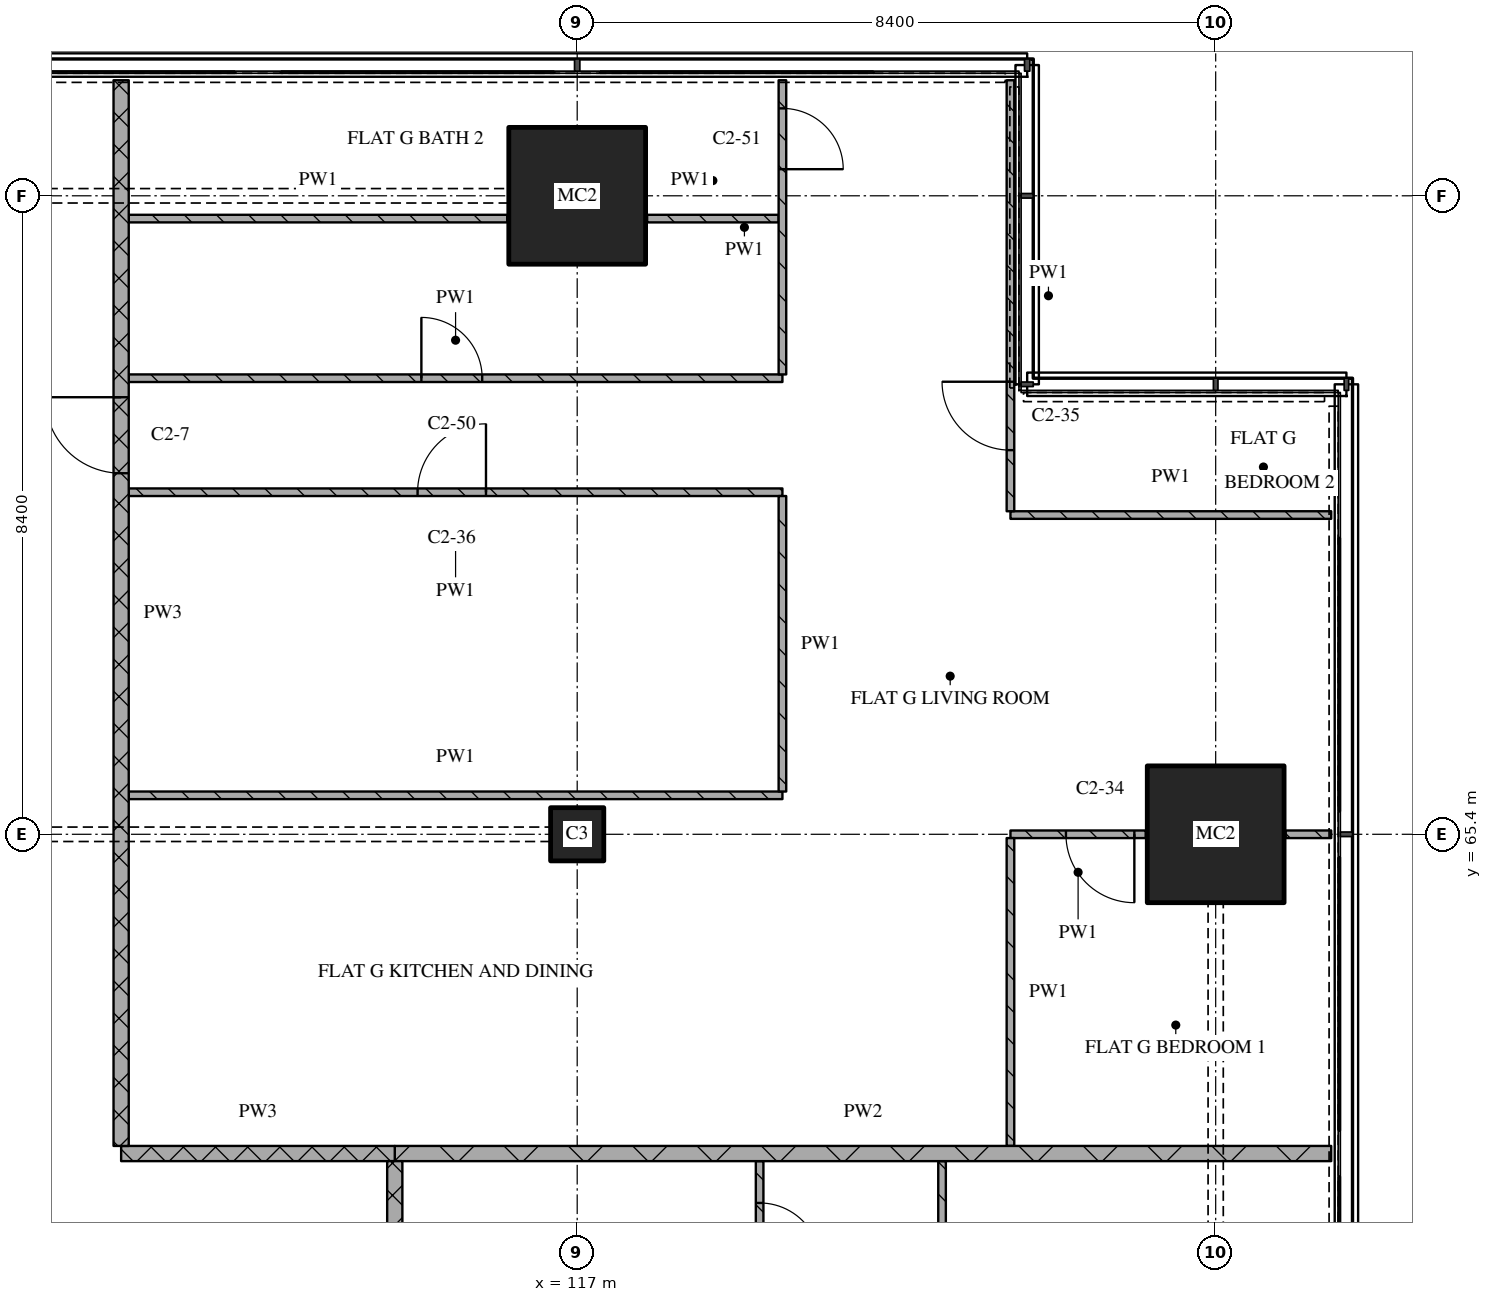
"""IFC4 building model, lengths in metres.
Left out: names, types, materials, properties, quantities, classifications, styles, units other than length and angle.
Written with IfcOpenShell. Run it as: python <this file> out.ifc"""

import sys

from ifc_helpers import new_model, si_unit, direction, frame, frame_2d, origin, origin_2d, place, context, subcontext, project, spatial, rectangle, extrude, element, fill, save


model = new_model("IFC4")
c1 = context("Model", 3, precision=1e-05, world=origin(), true_north=direction((0.0, 1.0)))
c2 = subcontext(c1, "Body", "Model", "MODEL_VIEW")
j1 = project(units=[si_unit("LENGTHUNIT", "METRE"), si_unit("PLANEANGLEUNIT", "RADIAN")], contexts=[c1])
p1 = place(None, origin())
s1 = spatial("IfcSite", under=j1, at=p1, CompositionType="ELEMENT")
p2 = place(p1, origin())
s2 = spatial("IfcBuilding", under=s1, at=p2, CompositionType="ELEMENT")
p3 = place(p2, frame((0.0, 0.0, 161.85)))
s3 = spatial("IfcBuildingStorey", under=s2, at=p3, CompositionType="ELEMENT", Elevation=161.85)
p4 = place(p3, frame((117.0, 65.4, 0.0), z_axis=(0.0, 0.0, 1.0), x_axis=(1.0, 0.0, 0.0)))
e1 = element("IfcColumn", 1, at=p4, inside=s3, PredefinedType="COLUMN", context=c2, shape_type="SweptSolid", body=[
    extrude(rectangle(XDim=0.7, YDim=0.7, at=origin_2d()), origin(), (0.0, 0.0, 1.0), 3.6),
])
for number, where, z_axis, x_axis in (
    (2, (117.0, 73.8, 0.0), (0.0, 0.0, 1.0), (1.0, 0.0, 0.0)),
    (3, (125.4, 65.4, 0.0), (0.0, 0.0, 1.0), (1.0, 0.0, 0.0)),
):
    element("IfcColumn", number, at=place(p3, frame(where, z_axis=z_axis, x_axis=x_axis)), inside=s3, PredefinedType="COLUMN", context=c2, shape_type="SweptSolid", body=[
        extrude(rectangle(XDim=1.8, YDim=1.8, at=origin_2d()), origin(), (0.0, 0.0, 1.0), 3.6),
    ])
p5 = place(p3, frame((111.0, 61.2, 0.0), z_axis=(0.0, 0.0, 1.0), x_axis=(1.0, 0.0, 0.0)))
e4 = element("IfcWall", 4, at=p5, inside=s3, PredefinedType="PARTITIONING", context=c2, shape_type="SweptSolid", body=[
    extrude(rectangle(XDim=3.6, YDim=0.2, at=frame_2d((1.8, 0.0))), origin(), (0.0, 0.0, 1.0), 3.32),
])
p6 = place(p3, frame((114.6, 61.2, 0.0), z_axis=(0.0, 0.0, 1.0), x_axis=(1.0, 0.0, 0.0)))
e5 = element("IfcWall", 5, at=p6, inside=s3, PredefinedType="PARTITIONING", context=c2, shape_type="SweptSolid", body=[
    extrude(rectangle(XDim=12.32, YDim=0.2, at=frame_2d((6.16, 0.0))), origin(), (0.0, 0.0, 1.0), 3.32),
])
p7 = place(p3, frame((124.48, 65.4, 0.0), z_axis=(0.0, 0.0, 1.0), x_axis=(-1.0, 0.0, 0.0)))
e6 = element("IfcWall", 6, at=p7, inside=s3, PredefinedType="PARTITIONING", context=c2, shape_type="SweptSolid", body=[
    extrude(rectangle(XDim=1.78, YDim=0.1, at=frame_2d((0.89, 0.0))), origin(), (0.0, 0.0, 1.0), 3.32),
])
p8 = place(p7, frame((0.15, 0.0, 0.0)))
e7 = element("IfcOpeningElement", 7, at=p8, cuts=e6, PredefinedType="OPENING", context=c2, shape_type="SweptSolid", body=[
    extrude(rectangle(XDim=0.9, YDim=2.1, at=frame_2d((0.45, 1.05))), frame((0.0, 0.06, 0.0), z_axis=(0.0, -1.0, 0.0), x_axis=(1.0, 0.0, 0.0)), (0.0, 0.0, 1.0), 0.12),
])
p9 = place(p3, frame((126.32, 65.4, 0.0), z_axis=(0.0, 0.0, 1.0), x_axis=(1.0, 0.0, 0.0)))
e8 = element("IfcWall", 8, at=p9, inside=s3, PredefinedType="PARTITIONING", context=c2, shape_type="SweptSolid", body=[
    extrude(rectangle(XDim=0.6, YDim=0.1, at=frame_2d((0.3, 0.0))), origin(), (0.0, 0.0, 1.0), 3.32),
])
p10 = place(p3, frame((111.1, 65.913, 0.0), z_axis=(0.0, 0.0, 1.0), x_axis=(1.0, 0.0, 0.0)))
e9 = element("IfcWall", 9, at=p10, inside=s3, PredefinedType="PARTITIONING", context=c2, shape_type="SweptSolid", body=[
    extrude(rectangle(XDim=8.6, YDim=0.1, at=frame_2d((4.3, 0.0))), origin(), (0.0, 0.0, 1.0), 3.32),
])
p11 = place(p3, frame((122.7, 69.6, 0.0), z_axis=(0.0, 0.0, 1.0), x_axis=(1.0, 0.0, 0.0)))
e10 = element("IfcWall", 10, at=p11, inside=s3, PredefinedType="PARTITIONING", context=c2, shape_type="SweptSolid", body=[
    extrude(rectangle(XDim=4.22, YDim=0.1, at=frame_2d((2.11, 0.0))), origin(), (0.0, 0.0, 1.0), 3.32),
])
p12 = place(p3, frame((119.7, 69.9, 0.0), z_axis=(0.0, 0.0, 1.0), x_axis=(-1.0, 0.0, 0.0)))
e11 = element("IfcWall", 11, at=p12, inside=s3, PredefinedType="PARTITIONING", context=c2, shape_type="SweptSolid", body=[
    extrude(rectangle(XDim=8.6, YDim=0.1, at=frame_2d((4.3, 0.0))), origin(), (0.0, 0.0, 1.0), 3.32),
])
p13 = place(p12, frame((3.9, 0.0, 0.0)))
e12 = element("IfcOpeningElement", 12, at=p13, cuts=e11, PredefinedType="OPENING", context=c2, shape_type="SweptSolid", body=[
    extrude(rectangle(XDim=0.9, YDim=2.1, at=frame_2d((0.45, 1.05))), frame((0.0, 0.06, 0.0), z_axis=(0.0, -1.0, 0.0), x_axis=(1.0, 0.0, 0.0)), (0.0, 0.0, 1.0), 0.12),
])
p14 = place(p3, frame((111.1, 71.4, 0.0), z_axis=(0.0, 0.0, 1.0), x_axis=(1.0, 0.0, 0.0)))
e13 = element("IfcWall", 13, at=p14, inside=s3, PredefinedType="PARTITIONING", context=c2, shape_type="SweptSolid", body=[
    extrude(rectangle(XDim=8.6, YDim=0.1, at=frame_2d((4.3, 0.0))), origin(), (0.0, 0.0, 1.0), 3.32),
])
p15 = place(p14, frame((3.85, 0.0, 0.0)))
e14 = element("IfcOpeningElement", 14, at=p15, cuts=e13, PredefinedType="OPENING", context=c2, shape_type="SweptSolid", body=[
    extrude(rectangle(XDim=0.8, YDim=2.1, at=frame_2d((0.4, 1.05))), frame((0.0, 0.06, 0.0), z_axis=(0.0, -1.0, 0.0), x_axis=(1.0, 0.0, 0.0)), (0.0, 0.0, 1.0), 0.12),
])
p16 = place(p3, frame((111.1, 73.5, 0.0), z_axis=(0.0, 0.0, 1.0), x_axis=(1.0, 0.0, 0.0)))
e15 = element("IfcWall", 15, at=p16, inside=s3, PredefinedType="PARTITIONING", context=c2, shape_type="SweptSolid", body=[
    extrude(rectangle(XDim=4.98, YDim=0.1, at=frame_2d((2.49, 0.0))), origin(), (0.0, 0.0, 1.0), 3.32),
])
p17 = place(p3, frame((117.92, 73.5, 0.0), z_axis=(0.0, 0.0, 1.0), x_axis=(1.0, 0.0, 0.0)))
e16 = element("IfcWall", 16, at=p17, inside=s3, PredefinedType="PARTITIONING", context=c2, shape_type="SweptSolid", body=[
    extrude(rectangle(XDim=1.73, YDim=0.1, at=frame_2d((0.865, 0.0))), origin(), (0.0, 0.0, 1.0), 3.32),
])
p18 = place(p3, frame((111.0, 75.32, 0.0), z_axis=(0.0, 0.0, 1.0), x_axis=(0.0, -1.0, 0.0)))
e17 = element("IfcWall", 17, at=p18, inside=s3, PredefinedType="PARTITIONING", context=c2, shape_type="SweptSolid", body=[
    extrude(rectangle(XDim=14.02, YDim=0.2, at=frame_2d((7.01, 0.0))), origin(), (0.0, 0.0, 1.0), 3.32),
])
p19 = place(p18, frame((4.17, 0.0, 0.0)))
e18 = element("IfcOpeningElement", 18, at=p19, cuts=e17, PredefinedType="OPENING", context=c2, shape_type="SweptSolid", body=[
    extrude(rectangle(XDim=1.0, YDim=2.1, at=frame_2d((0.5, 1.05))), frame((0.0, 0.11, 0.0), z_axis=(0.0, -1.0, 0.0), x_axis=(1.0, 0.0, 0.0)), (0.0, 0.0, 1.0), 0.22),
])
p20 = place(p3, frame((114.6, 61.1, 0.0), z_axis=(0.0, 0.0, 1.0), x_axis=(0.0, -1.0, 0.0)))
e19 = element("IfcWall", 19, at=p20, inside=s3, PredefinedType="PARTITIONING", context=c2, shape_type="SweptSolid", body=[
    extrude(rectangle(XDim=17.8, YDim=0.2, at=frame_2d((8.9, 0.0))), origin(), (0.0, 0.0, 1.0), 3.32),
])
p21 = place(p20, frame((5.25, 0.0, 0.0)))
e20 = element("IfcOpeningElement", 20, at=p21, cuts=e19, PredefinedType="OPENING", context=c2, shape_type="SweptSolid", body=[
    extrude(rectangle(XDim=1.0, YDim=2.1, at=frame_2d((0.5, 1.05))), frame((0.0, 0.11, 0.0), z_axis=(0.0, -1.0, 0.0), x_axis=(1.0, 0.0, 0.0)), (0.0, 0.0, 1.0), 0.22),
])
p22 = place(p3, frame((119.4, 56.15, 0.0), z_axis=(0.0, 0.0, 1.0), x_axis=(0.0, 1.0, 0.0)))
e21 = element("IfcWall", 21, at=p22, inside=s3, PredefinedType="PARTITIONING", context=c2, shape_type="SweptSolid", body=[
    extrude(rectangle(XDim=4.95, YDim=0.1, at=frame_2d((2.475, 0.0))), origin(), (0.0, 0.0, 1.0), 3.32),
])
p23 = place(p22, frame((3.6, 0.0, 0.0)))
e22 = element("IfcOpeningElement", 22, at=p23, cuts=e21, PredefinedType="OPENING", context=c2, shape_type="SweptSolid", body=[
    extrude(rectangle(XDim=0.8, YDim=2.1, at=frame_2d((0.4, 1.05))), frame((0.0, 0.06, 0.0), z_axis=(0.0, -1.0, 0.0), x_axis=(1.0, 0.0, 0.0)), (0.0, 0.0, 1.0), 0.12),
])
p24 = place(p3, frame((119.7, 69.85, 0.0), z_axis=(0.0, 0.0, 1.0), x_axis=(0.0, -1.0, 0.0)))
e23 = element("IfcWall", 23, at=p24, inside=s3, PredefinedType="PARTITIONING", context=c2, shape_type="SweptSolid", body=[
    extrude(rectangle(XDim=3.887, YDim=0.1, at=frame_2d((1.944, 0.0))), origin(), (0.0, 0.0, 1.0), 3.32),
])
p25 = place(p3, frame((119.7, 71.45, 0.0), z_axis=(0.0, 0.0, 1.0), x_axis=(0.0, 1.0, 0.0)))
e24 = element("IfcWall", 24, at=p25, inside=s3, PredefinedType="PARTITIONING", context=c2, shape_type="SweptSolid", body=[
    extrude(rectangle(XDim=3.87, YDim=0.1, at=frame_2d((1.935, 0.0))), origin(), (0.0, 0.0, 1.0), 3.32),
])
p26 = place(p25, frame((2.7, 0.0, 0.0)))
e25 = element("IfcOpeningElement", 25, at=p26, cuts=e24, PredefinedType="OPENING", context=c2, shape_type="SweptSolid", body=[
    extrude(rectangle(XDim=0.8, YDim=2.1, at=frame_2d((0.4, 1.05))), frame((0.0, 0.06, 0.0), z_axis=(0.0, -1.0, 0.0), x_axis=(1.0, 0.0, 0.0)), (0.0, 0.0, 1.0), 0.12),
])
p27 = place(p3, frame((121.8, 61.1, 0.0), z_axis=(0.0, 0.0, 1.0), x_axis=(0.0, -1.0, 0.0)))
e26 = element("IfcWall", 26, at=p27, inside=s3, PredefinedType="PARTITIONING", context=c2, shape_type="SweptSolid", body=[
    extrude(rectangle(XDim=8.25, YDim=0.1, at=frame_2d((4.125, 0.0))), origin(), (0.0, 0.0, 1.0), 3.32),
])
p28 = place(p27, frame((3.65, 0.0, 0.0)))
e27 = element("IfcOpeningElement", 27, at=p28, cuts=e26, PredefinedType="OPENING", context=c2, shape_type="SweptSolid", body=[
    extrude(rectangle(XDim=0.9, YDim=2.1, at=frame_2d((0.45, 1.05))), frame((0.0, 0.06, 0.0), z_axis=(0.0, -1.0, 0.0), x_axis=(1.0, 0.0, 0.0)), (0.0, 0.0, 1.0), 0.12),
])
p29 = place(p3, frame((122.7, 65.35, 0.0), z_axis=(0.0, 0.0, 1.0), x_axis=(0.0, -1.0, 0.0)))
e28 = element("IfcWall", 28, at=p29, inside=s3, PredefinedType="PARTITIONING", context=c2, shape_type="SweptSolid", body=[
    extrude(rectangle(XDim=4.05, YDim=0.1, at=frame_2d((2.025, 0.0))), origin(), (0.0, 0.0, 1.0), 3.32),
])
p30 = place(p3, frame((122.7, 75.32, 0.0), z_axis=(0.0, 0.0, 1.0), x_axis=(0.0, -1.0, 0.0)))
e29 = element("IfcWall", 29, at=p30, inside=s3, PredefinedType="PARTITIONING", context=c2, shape_type="SweptSolid", body=[
    extrude(rectangle(XDim=5.67, YDim=0.1, at=frame_2d((2.835, 0.0))), origin(), (0.0, 0.0, 1.0), 3.32),
])
p31 = place(p30, frame((3.966, 0.0, 0.0)))
e30 = element("IfcOpeningElement", 30, at=p31, cuts=e29, PredefinedType="OPENING", context=c2, shape_type="SweptSolid", body=[
    extrude(rectangle(XDim=0.9, YDim=2.1, at=frame_2d((0.45, 1.05))), frame((0.0, 0.06, 0.0), z_axis=(0.0, -1.0, 0.0), x_axis=(1.0, 0.0, 0.0)), (0.0, 0.0, 1.0), 0.12),
])
p32 = place(p8, origin())
e31 = element("IfcDoor", 31, at=p32, inside=s3, OperationType="SINGLE_SWING_LEFT", PredefinedType="DOOR", context=c2, shape_type="SweptSolid", body=[
    extrude(rectangle(XDim=0.9, YDim=2.1, at=frame_2d((0.45, 1.05))), frame((0.0, 0.025, 0.0), z_axis=(0.0, -1.0, 0.0), x_axis=(1.0, 0.0, 0.0)), (0.0, 0.0, 1.0), 0.05),
])
fill(e7, e31)
p33 = place(p13, origin())
e32 = element("IfcDoor", 32, at=p33, inside=s3, OperationType="SINGLE_SWING_RIGHT", PredefinedType="DOOR", context=c2, shape_type="SweptSolid", body=[
    extrude(rectangle(XDim=0.9, YDim=2.1, at=frame_2d((0.45, 1.05))), frame((0.0, 0.025, 0.0), z_axis=(0.0, -1.0, 0.0), x_axis=(1.0, 0.0, 0.0)), (0.0, 0.0, 1.0), 0.05),
])
fill(e12, e32)
p34 = place(p15, origin())
e33 = element("IfcDoor", 33, at=p34, inside=s3, OperationType="SINGLE_SWING_LEFT", PredefinedType="DOOR", context=c2, shape_type="SweptSolid", body=[
    extrude(rectangle(XDim=0.8, YDim=2.1, at=frame_2d((0.4, 1.05))), frame((0.0, 0.025, 0.0), z_axis=(0.0, -1.0, 0.0), x_axis=(1.0, 0.0, 0.0)), (0.0, 0.0, 1.0), 0.05),
])
fill(e14, e33)
p35 = place(p19, origin())
e34 = element("IfcDoor", 34, at=p35, inside=s3, OperationType="SINGLE_SWING_RIGHT", PredefinedType="DOOR", context=c2, shape_type="SweptSolid", body=[
    extrude(rectangle(XDim=1.0, YDim=2.1, at=frame_2d((0.5, 1.05))), frame((0.0, 0.025, 0.0), z_axis=(0.0, -1.0, 0.0), x_axis=(1.0, 0.0, 0.0)), (0.0, 0.0, 1.0), 0.05),
])
fill(e18, e34)
p36 = place(p23, origin())
e35 = element("IfcDoor", 35, at=p36, inside=s3, OperationType="SINGLE_SWING_RIGHT", PredefinedType="DOOR", context=c2, shape_type="SweptSolid", body=[
    extrude(rectangle(XDim=0.8, YDim=2.1, at=frame_2d((0.4, 1.05))), frame((0.0, 0.025, 0.0), z_axis=(0.0, -1.0, 0.0), x_axis=(1.0, 0.0, 0.0)), (0.0, 0.0, 1.0), 0.05),
])
fill(e22, e35)
p37 = place(p26, origin())
e36 = element("IfcDoor", 36, at=p37, inside=s3, OperationType="SINGLE_SWING_RIGHT", PredefinedType="DOOR", context=c2, shape_type="SweptSolid", body=[
    extrude(rectangle(XDim=0.8, YDim=2.1, at=frame_2d((0.4, 1.05))), frame((0.0, 0.025, 0.0), z_axis=(0.0, -1.0, 0.0), x_axis=(1.0, 0.0, 0.0)), (0.0, 0.0, 1.0), 0.05),
])
fill(e25, e36)
p38 = place(p31, origin())
e37 = element("IfcDoor", 37, at=p38, inside=s3, OperationType="SINGLE_SWING_RIGHT", PredefinedType="DOOR", context=c2, shape_type="SweptSolid", body=[
    extrude(rectangle(XDim=0.9, YDim=2.1, at=frame_2d((0.45, 1.05))), frame((0.0, 0.025, 0.0), z_axis=(0.0, -1.0, 0.0), x_axis=(1.0, 0.0, 0.0)), (0.0, 0.0, 1.0), 0.05),
])
fill(e30, e37)
save(model, sys.argv[1])
